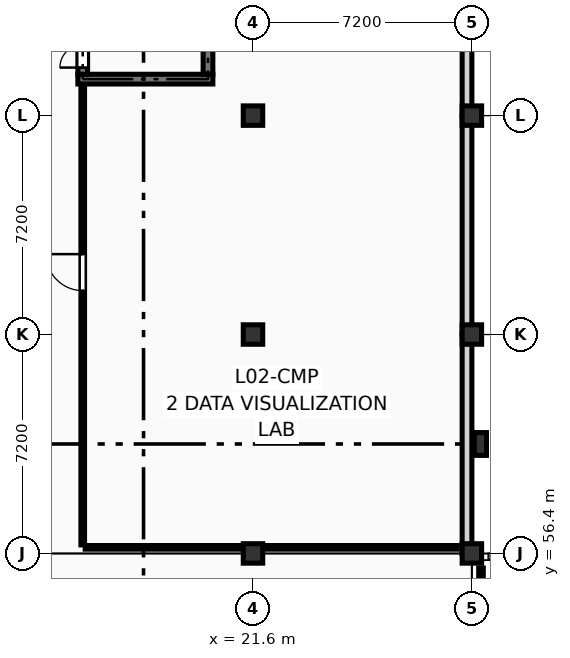
"""IFC4 building model, lengths in metres.
Left out: names, types, materials, properties, quantities, classifications, styles, units other than length and angle.
Written with IfcOpenShell. Run it as: python <this file> out.ifc"""

import sys

from ifc_helpers import new_model, si_unit, direction, frame, frame_2d, origin, origin_2d, place, context, subcontext, project, spatial, rectangle, extrude, element, fill, save


model = new_model("IFC4")
c1 = context("Model", 3, precision=1e-05, world=origin(), true_north=direction((0.0, 1.0)))
c2 = subcontext(c1, "Body", "Model", "MODEL_VIEW")
j1 = project(units=[si_unit("LENGTHUNIT", "METRE"), si_unit("PLANEANGLEUNIT", "RADIAN")], contexts=[c1])
p1 = place(None, origin())
s1 = spatial("IfcSite", under=j1, at=p1, CompositionType="ELEMENT")
p2 = place(p1, origin())
s2 = spatial("IfcBuilding", under=s1, at=p2, CompositionType="ELEMENT")
p3 = place(p2, frame((0.0, 0.0, 8.55)))
s3 = spatial("IfcBuildingStorey", under=s2, at=p3, CompositionType="ELEMENT", Elevation=8.55)
for number, where, z_axis, x_axis in (
    (1, (21.6, 56.4, 0.0), (0.0, 0.0, 1.0), (1.0, 0.0, 0.0)),
    (2, (21.6, 63.6, 0.0), (0.0, 0.0, 1.0), (1.0, 0.0, 0.0)),
    (3, (21.6, 70.8, 0.0), (0.0, 0.0, 1.0), (1.0, 0.0, 0.0)),
    (4, (28.8, 56.4, 0.0), (0.0, 0.0, 1.0), (1.0, 0.0, 0.0)),
    (5, (28.8, 63.6, 0.0), (0.0, 0.0, 1.0), (1.0, 0.0, 0.0)),
    (6, (28.8, 70.8, 0.0), (0.0, 0.0, 1.0), (1.0, 0.0, 0.0)),
):
    element("IfcColumn", number, at=place(p3, frame(where, z_axis=z_axis, x_axis=x_axis)), inside=s3, PredefinedType="COLUMN", context=c2, shape_type="SweptSolid", body=[
        extrude(rectangle(XDim=0.64, YDim=0.64, at=origin_2d()), origin(), (0.0, 0.0, 1.0), 3.6),
    ])
p4 = place(p3, frame((29.08, 60.0, 0.0), z_axis=(0.0, 0.0, 1.0), x_axis=(1.0, 0.0, 0.0)))
e7 = element("IfcColumn", 7, at=p4, inside=s3, PredefinedType="PILASTER", context=c2, shape_type="SweptSolid", body=[
    extrude(rectangle(XDim=0.4, YDim=0.75, at=origin_2d()), origin(), (0.0, 0.0, 1.0), 3.6),
])
for number, where, z_axis, x_axis in (
    (8, (28.64, 70.8, 0.0), (0.0, 0.0, 1.0), (0.0, 1.0, 0.0)),
    (9, (28.64, 63.6, 0.0), (0.0, 0.0, 1.0), (0.0, 1.0, 0.0)),
):
    element("IfcWall", number, at=place(p3, frame(where, z_axis=z_axis, x_axis=x_axis)), inside=s3, PredefinedType="SOLIDWALL", context=c2, shape_type="SweptSolid", body=[
        extrude(rectangle(XDim=7.2, YDim=0.32, at=frame_2d((3.6, 0.0))), origin(), (0.0, 0.0, 1.0), 2.84),
    ])
p5 = place(p3, frame((28.64, 56.4, 0.0), z_axis=(0.0, 0.0, 1.0), x_axis=(0.0, 1.0, 0.0)))
e10 = element("IfcWall", 10, at=p5, inside=s3, PredefinedType="SOLIDWALL", context=c2, shape_type="SweptSolid", body=[
    extrude(rectangle(XDim=7.2, YDim=0.32, at=frame_2d((3.6, 0.0))), origin(), (0.0, 0.0, 1.0), 2.84),
])
p6 = place(p3, frame((15.84, 72.0, 0.0), z_axis=(0.0, 0.0, 1.0), x_axis=(1.0, 0.0, 0.0)))
e11 = element("IfcWall", 11, at=p6, inside=s3, PredefinedType="SHEAR", context=c2, shape_type="SweptSolid", body=[
    extrude(rectangle(XDim=4.44, YDim=0.32, at=frame_2d((2.22, 0.0))), origin(), (0.0, 0.0, 1.0), 3.39),
])
p7 = place(p3, frame((16.0, 72.16, 0.0), z_axis=(0.0, 0.0, 1.0), x_axis=(0.0, 1.0, 0.0)))
e12 = element("IfcWall", 12, at=p7, inside=s3, PredefinedType="SHEAR", context=c2, shape_type="SweptSolid", body=[
    extrude(rectangle(XDim=7.28, YDim=0.32, at=frame_2d((3.64, 0.0))), origin(), (0.0, 0.0, 1.0), 3.39),
])
p8 = place(p7, frame((0.22, 0.0, 0.0)))
e13 = element("IfcOpeningElement", 13, at=p8, cuts=e12, PredefinedType="OPENING", context=c2, shape_type="SweptSolid", body=[
    extrude(rectangle(XDim=1.5, YDim=2.2, at=frame_2d((0.75, 1.1))), frame((0.0, 0.172, 0.0), z_axis=(0.0, -1.0, 0.0), x_axis=(1.0, 0.0, 0.0)), (0.0, 0.0, 1.0), 0.344),
])
p9 = place(p3, frame((20.12, 72.16, 0.0), z_axis=(0.0, 0.0, 1.0), x_axis=(0.0, 1.0, 0.0)))
e14 = element("IfcWall", 14, at=p9, inside=s3, PredefinedType="SHEAR", context=c2, shape_type="SweptSolid", body=[
    extrude(rectangle(XDim=7.28, YDim=0.32, at=frame_2d((3.64, 0.0))), origin(), (0.0, 0.0, 1.0), 3.39),
])
p10 = place(p3, frame((29.1, 45.28, 0.0), z_axis=(0.0, 0.0, 1.0), x_axis=(0.0, 1.0, 0.0)))
e15 = element("IfcWall", 15, at=p10, inside=s3, PredefinedType="PARTITIONING", context=c2, shape_type="SweptSolid", body=[
    extrude(rectangle(XDim=10.64, YDim=0.15, at=frame_2d((5.32, 0.0))), origin(), (0.0, 0.0, 1.0), 2.655),
])
p11 = place(p3, frame((16.0, 56.68, 0.0), z_axis=(0.0, 0.0, 1.0), x_axis=(0.0, 1.0, 0.0)))
e16 = element("IfcWall", 16, at=p11, inside=s3, PredefinedType="PARTITIONING", context=c2, shape_type="SweptSolid", body=[
    extrude(rectangle(XDim=15.12, YDim=0.12, at=frame_2d((7.56, 0.0))), origin(), (0.0, 0.0, 1.0), 3.375),
])
p12 = place(p11, frame((8.364, 0.0, 0.0)))
e17 = element("IfcOpeningElement", 17, at=p12, cuts=e16, PredefinedType="OPENING", context=c2, shape_type="SweptSolid", body=[
    extrude(rectangle(XDim=1.2, YDim=2.15, at=frame_2d((0.6, 1.075))), frame((0.0, 0.072, 0.0), z_axis=(0.0, -1.0, 0.0), x_axis=(1.0, 0.0, 0.0)), (0.0, 0.0, 1.0), 0.144),
])
p13 = place(p3, frame((16.08, 56.6, 0.0), z_axis=(0.0, 0.0, 1.0), x_axis=(1.0, 0.0, 0.0)))
e18 = element("IfcWall", 18, at=p13, inside=s3, PredefinedType="PARTITIONING", context=c2, shape_type="SweptSolid", body=[
    extrude(rectangle(XDim=12.24, YDim=0.12, at=frame_2d((6.12, 0.0))), origin(), (0.0, 0.0, 1.0), 2.595),
])
p14 = place(p8, origin())
e19 = element("IfcDoor", 19, at=p14, inside=s3, OperationType="DOUBLE_DOOR_SINGLE_SWING", PredefinedType="DOOR", context=c2, shape_type="SweptSolid", body=[
    extrude(rectangle(XDim=1.5, YDim=2.2, at=frame_2d((0.75, 1.1))), frame((0.0, 0.025, 0.0), z_axis=(0.0, -1.0, 0.0), x_axis=(1.0, 0.0, 0.0)), (0.0, 0.0, 1.0), 0.05),
])
fill(e13, e19)
p15 = place(p12, origin())
e20 = element("IfcDoor", 20, at=p15, inside=s3, OperationType="SINGLE_SWING_RIGHT", PredefinedType="DOOR", context=c2, shape_type="SweptSolid", body=[
    extrude(rectangle(XDim=1.2, YDim=2.15, at=frame_2d((0.6, 1.075))), frame((0.0, 0.025, 0.0), z_axis=(0.0, -1.0, 0.0), x_axis=(1.0, 0.0, 0.0)), (0.0, 0.0, 1.0), 0.05),
])
fill(e17, e20)
save(model, sys.argv[1])
